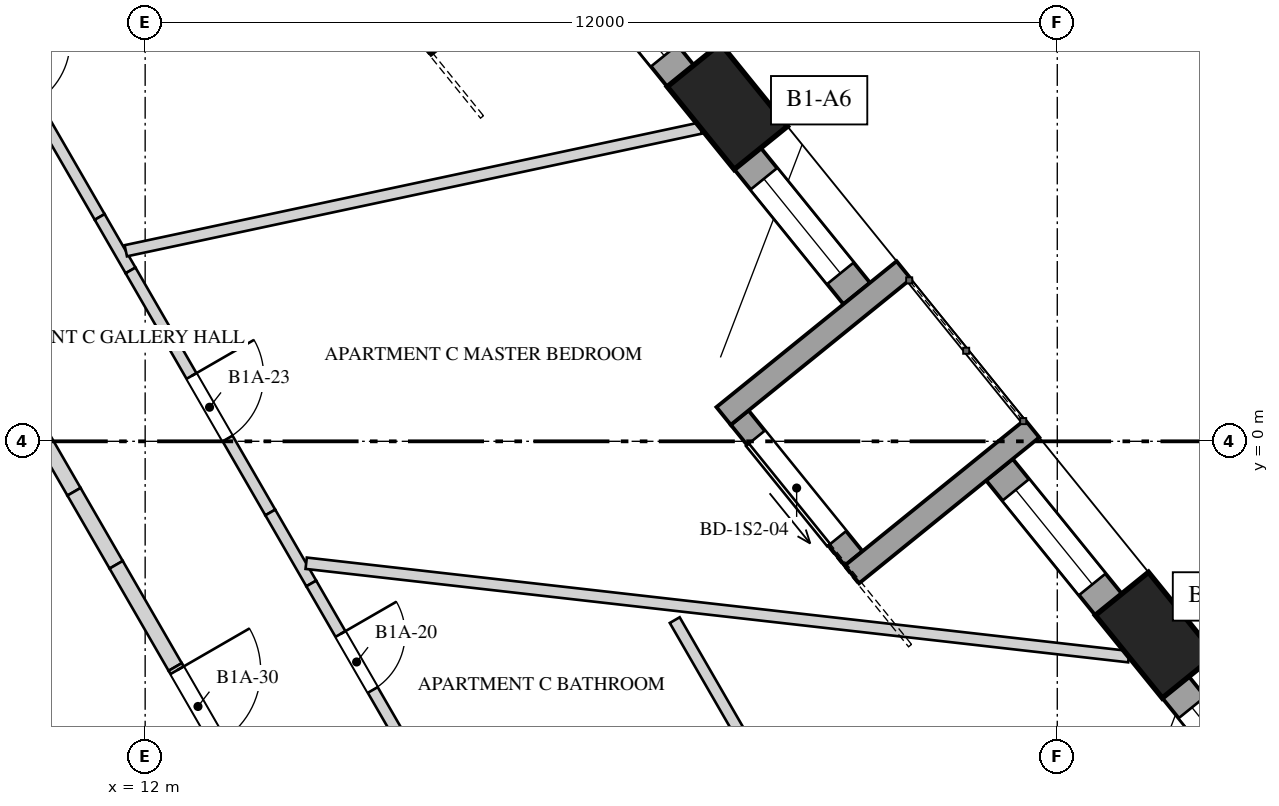
"""IFC4 building model, lengths in metres.
Left out: names, types, materials, properties, quantities, classifications, styles, units other than length and angle.
Written with IfcOpenShell. Run it as: python <this file> out.ifc"""

import sys

from ifc_helpers import new_model, si_unit, direction, frame, frame_2d, origin, origin_2d, place, context, subcontext, project, spatial, polyline, rectangle, outline, extrude, element, fill, save


model = new_model("IFC4")
c1 = context("Model", 3, precision=1e-05, world=origin(), true_north=direction((0.0, 1.0)))
c2 = subcontext(c1, "Body", "Model", "MODEL_VIEW")
j1 = project(units=[si_unit("LENGTHUNIT", "METRE"), si_unit("PLANEANGLEUNIT", "RADIAN")], contexts=[c1])
p1 = place(None, origin())
s1 = spatial("IfcSite", under=j1, at=p1, CompositionType="ELEMENT")
p2 = place(p1, origin())
s2 = spatial("IfcBuilding", under=s1, at=p2, CompositionType="ELEMENT")
p3 = place(p2, frame((0.0, 0.0, 51.2)))
s3 = spatial("IfcBuildingStorey", under=s2, at=p3, CompositionType="ELEMENT", Elevation=51.2)
for number, where, z_axis, x_axis in (
    (1, (25.291, -2.55, -0.35), (0.0, 0.0, 1.0), (-0.629, 0.777, 0.0)),
    (2, (19.659, 4.405, -0.35), (0.0, 0.0, 1.0), (-0.629, 0.777, 0.0)),
):
    element("IfcColumn", number, at=place(p3, frame(where, z_axis=z_axis, x_axis=x_axis)), inside=s3, PredefinedType="COLUMN", context=c2, shape_type="SweptSolid", body=[
        extrude(rectangle(XDim=1.4, YDim=0.9, at=origin_2d()), origin(), (0.0, 0.0, 1.0), 4.35),
    ])
p4 = place(p3, frame((26.993, -5.01, 0.0), z_axis=(0.0, 0.0, 1.0), x_axis=(-0.629339730135, 0.777130300576, 0.0)))
e3 = element("IfcWall", 3, at=p4, inside=s3, PredefinedType="SOLIDWALL", context=c2, shape_type="SweptSolid", body=[
    extrude(rectangle(XDim=2.283, YDim=0.45, at=frame_2d((1.142, 0.0))), origin(), (0.0, 0.0, 1.0), 3.3),
])
p5 = place(p4, frame((0.342, 0.0, 0.7)))
e4 = element("IfcOpeningElement", 4, at=p5, cuts=e3, PredefinedType="OPENING", context=c2, shape_type="SweptSolid", body=[
    extrude(rectangle(XDim=1.6, YDim=2.3, at=frame_2d((0.8, 1.15))), frame((0.0, 0.235, 0.0), z_axis=(0.0, -1.0, 0.0), x_axis=(1.0, 0.0, 0.0)), (0.0, 0.0, 1.0), 0.47),
])
p6 = place(p3, frame((24.676, -2.148, 0.0), z_axis=(0.0, 0.0, 1.0), x_axis=(-0.629287431131, 0.777172650716, 0.0)))
e5 = element("IfcWall", 5, at=p6, inside=s3, PredefinedType="SOLIDWALL", context=c2, shape_type="SweptSolid", body=[
    extrude(rectangle(XDim=2.283, YDim=0.45, at=frame_2d((1.142, 0.0))), origin(), (0.0, 0.0, 1.0), 3.3),
])
p7 = place(p6, frame((0.342, 0.0, 0.7)))
e6 = element("IfcOpeningElement", 6, at=p7, cuts=e5, PredefinedType="OPENING", context=c2, shape_type="SweptSolid", body=[
    extrude(rectangle(XDim=1.6, YDim=2.3, at=frame_2d((0.8, 1.15))), frame((0.0, 0.235, 0.0), z_axis=(0.0, -1.0, 0.0), x_axis=(1.0, 0.0, 0.0)), (0.0, 0.0, 1.0), 0.47),
])
p8 = place(p3, frame((21.362, 1.945, 0.0), z_axis=(0.0, 0.0, 1.0), x_axis=(-0.629339730135, 0.777130300576, 0.0)))
e7 = element("IfcWall", 7, at=p8, inside=s3, PredefinedType="SOLIDWALL", context=c2, shape_type="SweptSolid", body=[
    extrude(rectangle(XDim=2.283, YDim=0.45, at=frame_2d((1.142, 0.0))), origin(), (0.0, 0.0, 1.0), 3.3),
])
p9 = place(p8, frame((0.342, 0.0, 0.7)))
e8 = element("IfcOpeningElement", 8, at=p9, cuts=e7, PredefinedType="OPENING", context=c2, shape_type="SweptSolid", body=[
    extrude(rectangle(XDim=1.6, YDim=2.3, at=frame_2d((0.8, 1.15))), frame((0.0, 0.235, 0.0), z_axis=(0.0, -1.0, 0.0), x_axis=(1.0, 0.0, 0.0)), (0.0, 0.0, 1.0), 0.47),
])
p10 = place(p3, frame((19.044, 4.807, 0.0), z_axis=(0.0, 0.0, 1.0), x_axis=(-0.629339730135, 0.777130300576, 0.0)))
e9 = element("IfcWall", 9, at=p10, inside=s3, PredefinedType="SOLIDWALL", context=c2, shape_type="SweptSolid", body=[
    extrude(rectangle(XDim=2.283, YDim=0.45, at=frame_2d((1.142, 0.0))), origin(), (0.0, 0.0, 1.0), 3.3),
])
p11 = place(p10, frame((0.342, 0.0, 0.7)))
e10 = element("IfcOpeningElement", 10, at=p11, cuts=e9, PredefinedType="OPENING", context=c2, shape_type="SweptSolid", body=[
    extrude(rectangle(XDim=1.6, YDim=2.3, at=frame_2d((0.8, 1.15))), frame((0.0, 0.235, 0.0), z_axis=(0.0, -1.0, 0.0), x_axis=(1.0, 0.0, 0.0)), (0.0, 0.0, 1.0), 0.47),
])
p12 = place(p3, frame((21.321, -1.541, 0.0), z_axis=(0.0, 0.0, 1.0), x_axis=(-0.629257171563, 0.777197151331, 0.0)))
e11 = element("IfcWall", 11, at=p12, inside=s3, PredefinedType="SOLIDWALL", context=c2, shape_type="SweptSolid", body=[
    extrude(rectangle(XDim=2.383, YDim=0.3, at=frame_2d((1.191, 0.0))), origin(), (0.0, 0.0, 1.0), 3.3),
])
p13 = place(p12, frame((0.342, 0.0, 0.0)))
e12 = element("IfcOpeningElement", 12, at=p13, cuts=e11, PredefinedType="OPENING", context=c2, shape_type="SweptSolid", body=[
    extrude(rectangle(XDim=1.7, YDim=2.4, at=frame_2d((0.85, 1.2))), frame((0.0, 0.16, 0.0), z_axis=(0.0, -1.0, 0.0), x_axis=(1.0, 0.0, 0.0)), (0.0, 0.0, 1.0), 0.32),
])
for number, where, z_axis, x_axis in (
    (13, (23.669, 0.168, 0.0), (0.0, 0.0, 1.0), (-0.777, -0.629, 0.0)),
    (14, (21.98, 2.253, 0.0), (0.0, 0.0, 1.0), (-0.777, -0.629, 0.0)),
):
    element("IfcWall", number, at=place(p3, frame(where, z_axis=z_axis, x_axis=x_axis)), inside=s3, PredefinedType="SOLIDWALL", context=c2, shape_type="SweptSolid", body=[
        extrude(rectangle(XDim=3.05, YDim=0.3, at=frame_2d((1.525, 0.0))), origin(), (0.0, 0.0, 1.0), 3.3),
    ])
p14 = place(p3, frame((18.037, 7.123, 0.0), z_axis=(0.0, 0.0, 1.0), x_axis=(-0.777153523895, -0.629311052102, 0.0)))
e15 = element("IfcWall", 15, at=p14, inside=s3, PredefinedType="SOLIDWALL", context=c2, shape_type="SweptSolid", body=[
    extrude(rectangle(XDim=3.05, YDim=0.3, at=frame_2d((1.525, 0.0))), origin(), (0.0, 0.0, 1.0), 3.3),
])
p15 = place(p3, frame((9.101, 6.936, 0.0), z_axis=(0.0, 0.0, 1.0), x_axis=(0.500008794324, -0.866020326319, 0.0)))
e16 = element("IfcWall", 16, at=p15, inside=s3, PredefinedType="PARTITIONING", context=c2, shape_type="SweptSolid", body=[
    extrude(rectangle(XDim=4.601, YDim=0.15, at=frame_2d((2.3, 0.0))), origin(), (0.0, 0.0, 1.0), 3.65),
])
p16 = place(p15, frame((1.922, 0.0, 0.0)))
e17 = element("IfcOpeningElement", 17, at=p16, cuts=e16, PredefinedType="OPENING", context=c2, shape_type="SweptSolid", body=[
    extrude(rectangle(XDim=0.95, YDim=2.4, at=frame_2d((0.475, 1.2))), frame((0.0, 0.085, 0.0), z_axis=(0.0, -1.0, 0.0), x_axis=(1.0, 0.0, 0.0)), (0.0, 0.0, 1.0), 0.17),
])
p17 = place(p3, frame((11.402, 2.952, 0.0), z_axis=(0.0, 0.0, 1.0), x_axis=(0.500147393723, -0.865940289253, 0.0)))
e18 = element("IfcWall", 18, at=p17, inside=s3, PredefinedType="PARTITIONING", context=c2, shape_type="SweptSolid", body=[
    extrude(rectangle(XDim=0.812, YDim=0.15, at=frame_2d((0.406, 0.0))), origin(), (0.0, 0.0, 1.0), 2.75),
])
p18 = place(p3, frame((11.808, 2.248, 0.0), z_axis=(0.0, 0.0, 1.0), x_axis=(0.500002145574, -0.866024165033, 0.0)))
e19 = element("IfcWall", 19, at=p18, inside=s3, PredefinedType="PARTITIONING", context=c2, shape_type="SweptSolid", body=[
    extrude(rectangle(XDim=3.677, YDim=0.15, at=frame_2d((1.839, 0.0))), origin(), (0.0, 0.0, 1.0), 3.65),
])
p19 = place(p18, frame((1.604, 0.0, 0.0)))
e20 = element("IfcOpeningElement", 20, at=p19, cuts=e19, PredefinedType="OPENING", context=c2, shape_type="SweptSolid", body=[
    extrude(rectangle(XDim=0.95, YDim=2.4, at=frame_2d((0.475, 1.2))), frame((0.0, 0.085, 0.0), z_axis=(0.0, -1.0, 0.0), x_axis=(1.0, 0.0, 0.0)), (0.0, 0.0, 1.0), 0.17),
])
p20 = place(p3, frame((13.646, -0.936, 0.0), z_axis=(0.0, 0.0, 1.0), x_axis=(0.499938053331, -0.866061165757, 0.0)))
e21 = element("IfcWall", 21, at=p20, inside=s3, PredefinedType="PARTITIONING", context=c2, shape_type="SweptSolid", body=[
    extrude(rectangle(XDim=1.078, YDim=0.15, at=frame_2d((0.539, 0.0))), origin(), (0.0, 0.0, 1.0), 2.55),
])
p21 = place(p3, frame((14.186, -1.87, 0.0), z_axis=(0.0, 0.0, 1.0), x_axis=(0.499999305434, -0.866025804792, 0.0)))
e22 = element("IfcWall", 22, at=p21, inside=s3, PredefinedType="PARTITIONING", context=c2, shape_type="SweptSolid", body=[
    extrude(rectangle(XDim=2.748, YDim=0.15, at=frame_2d((1.374, 0.0))), origin(), (0.0, 0.0, 1.0), 3.65),
])
p22 = place(p21, frame((0.768, 0.0, 0.0)))
e23 = element("IfcOpeningElement", 23, at=p22, cuts=e22, PredefinedType="OPENING", context=c2, shape_type="SweptSolid", body=[
    extrude(rectangle(XDim=0.85, YDim=2.4, at=frame_2d((0.425, 1.2))), frame((0.0, 0.085, 0.0), z_axis=(0.0, -1.0, 0.0), x_axis=(1.0, 0.0, 0.0)), (0.0, 0.0, 1.0), 0.17),
])
p23 = place(p3, frame((11.745, 2.507, 0.0), z_axis=(0.0, 0.0, 1.0), x_axis=(0.97797299527, 0.208731455516, 0.0)))
e24 = element("IfcWall", 24, at=p23, inside=s3, PredefinedType="PARTITIONING", context=c2, shape_type="SweptSolid", body=[
    extrude(rectangle(XDim=7.735, YDim=0.15, at=frame_2d((3.867, 0.0))), origin(), (0.0, 0.0, 1.0), 2.75),
])
p24 = place(p3, frame((14.118, -1.604, 0.0), z_axis=(0.0, 0.0, 1.0), x_axis=(0.993609026083, -0.112876495722, 0.0)))
e25 = element("IfcWall", 25, at=p24, inside=s3, PredefinedType="PARTITIONING", context=c2, shape_type="SweptSolid", body=[
    extrude(rectangle(XDim=10.892, YDim=0.15, at=frame_2d((5.446, 0.0))), origin(), (0.0, 0.0, 1.0), 2.55),
])
p25 = place(p3, frame((18.967, -2.352, 0.0), z_axis=(0.0, 0.0, 1.0), x_axis=(0.499973180286, -0.8660408876, 0.0)))
e26 = element("IfcWall", 26, at=p25, inside=s3, PredefinedType="PARTITIONING", context=c2, shape_type="SweptSolid", body=[
    extrude(rectangle(XDim=2.191, YDim=0.15, at=frame_2d((1.096, 0.0))), origin(), (0.0, 0.0, 1.0), 3.65),
])
p26 = place(p3, frame((9.667, 1.756, 0.0), z_axis=(0.0, 0.0, 1.0), x_axis=(0.499964529649, -0.866045881633, 0.0)))
e27 = element("IfcWall", 27, at=p26, inside=s3, PredefinedType="SOLIDWALL", context=c2, shape_type="SweptSolid", body=[
    extrude(rectangle(XDim=2.794, YDim=0.2, at=frame_2d((1.397, 0.0))), origin(), (0.0, 0.0, 1.0), 3.65),
])
p27 = place(p3, frame((11.064, -0.663, 0.0), z_axis=(0.0, 0.0, 1.0), x_axis=(0.499951133605, -0.866053614973, 0.0)))
e28 = element("IfcWall", 28, at=p27, inside=s3, PredefinedType="SOLIDWALL", context=c2, shape_type="SweptSolid", body=[
    extrude(rectangle(XDim=1.109, YDim=0.2, at=frame_2d((0.554, 0.0))), origin(), (0.0, 0.0, 1.0), 2.55),
])
p28 = place(p3, frame((11.618, -1.624, 0.0), z_axis=(0.0, 0.0, 1.0), x_axis=(0.50011257031, -0.86596040153, 0.0)))
e29 = element("IfcWall", 29, at=p28, inside=s3, PredefinedType="SOLIDWALL", context=c2, shape_type="SweptSolid", body=[
    extrude(rectangle(XDim=1.553, YDim=0.2, at=frame_2d((0.776, 0.0))), origin(), (0.0, 0.0, 1.0), 3.65),
])
p29 = place(p3, frame((12.395, -2.969, 0.0), z_axis=(0.0, 0.0, 1.0), x_axis=(0.499936694431, -0.866061950187, 0.0)))
e30 = element("IfcWall", 30, at=p29, inside=s3, PredefinedType="SOLIDWALL", context=c2, shape_type="SweptSolid", body=[
    extrude(outline(polyline([(0.0, 0.0), (1.48, 0.0), (1.479, 2.55), (0.409, 2.55), (0.409, 3.65), (0.0, 3.65), (0.0, 0.0)])), frame((0.0, 0.1, 0.0), z_axis=(0.0, -1.0, 0.0), x_axis=(1.0, 0.0, 0.0)), (0.0, 0.0, 1.0), 0.2),
])
p30 = place(p29, frame((0.05, 0.0, 0.0)))
e31 = element("IfcOpeningElement", 31, at=p30, cuts=e30, PredefinedType="OPENING", context=c2, shape_type="SweptSolid", body=[
    extrude(rectangle(XDim=1.1, YDim=2.4, at=frame_2d((0.55, 1.2))), frame((0.0, 0.11, 0.0), z_axis=(0.0, -1.0, 0.0), x_axis=(1.0, 0.0, 0.0)), (0.0, 0.0, 1.0), 0.22),
])
p31 = place(p5, origin())
e32 = element("IfcWindow", 32, at=p31, inside=s3, PartitioningType="SINGLE_PANEL", PredefinedType="WINDOW", context=c2, shape_type="SweptSolid", body=[
    extrude(rectangle(XDim=1.6, YDim=2.3, at=frame_2d((0.8, 1.15))), frame((0.0, 0.03, 0.0), z_axis=(0.0, -1.0, 0.0), x_axis=(1.0, 0.0, 0.0)), (0.0, 0.0, 1.0), 0.06),
])
fill(e4, e32)
p32 = place(p7, origin())
e33 = element("IfcWindow", 33, at=p32, inside=s3, PartitioningType="SINGLE_PANEL", PredefinedType="WINDOW", context=c2, shape_type="SweptSolid", body=[
    extrude(rectangle(XDim=1.6, YDim=2.3, at=frame_2d((0.8, 1.15))), frame((0.0, 0.03, 0.0), z_axis=(0.0, -1.0, 0.0), x_axis=(1.0, 0.0, 0.0)), (0.0, 0.0, 1.0), 0.06),
])
fill(e6, e33)
p33 = place(p9, origin())
e34 = element("IfcWindow", 34, at=p33, inside=s3, PartitioningType="SINGLE_PANEL", PredefinedType="WINDOW", context=c2, shape_type="SweptSolid", body=[
    extrude(rectangle(XDim=1.6, YDim=2.3, at=frame_2d((0.8, 1.15))), frame((0.0, 0.03, 0.0), z_axis=(0.0, -1.0, 0.0), x_axis=(1.0, 0.0, 0.0)), (0.0, 0.0, 1.0), 0.06),
])
fill(e8, e34)
p34 = place(p11, origin())
e35 = element("IfcWindow", 35, at=p34, inside=s3, PartitioningType="SINGLE_PANEL", PredefinedType="WINDOW", context=c2, shape_type="SweptSolid", body=[
    extrude(rectangle(XDim=1.6, YDim=2.3, at=frame_2d((0.8, 1.15))), frame((0.0, 0.03, 0.0), z_axis=(0.0, -1.0, 0.0), x_axis=(1.0, 0.0, 0.0)), (0.0, 0.0, 1.0), 0.06),
])
fill(e10, e35)
p35 = place(p13, origin())
e36 = element("IfcDoor", 36, at=p35, inside=s3, OperationType="SLIDING_TO_LEFT", PredefinedType="DOOR", context=c2, shape_type="SweptSolid", body=[
    extrude(rectangle(XDim=1.7, YDim=2.4, at=frame_2d((0.85, 1.2))), frame((0.0, 0.025, 0.0), z_axis=(0.0, -1.0, 0.0), x_axis=(1.0, 0.0, 0.0)), (0.0, 0.0, 1.0), 0.05),
])
fill(e12, e36)
p36 = place(p22, origin())
e37 = element("IfcDoor", 37, at=p36, inside=s3, OperationType="SINGLE_SWING_RIGHT", PredefinedType="DOOR", context=c2, shape_type="SweptSolid", body=[
    extrude(rectangle(XDim=0.85, YDim=2.4, at=frame_2d((0.425, 1.2))), frame((0.0, 0.025, 0.0), z_axis=(0.0, -1.0, 0.0), x_axis=(1.0, 0.0, 0.0)), (0.0, 0.0, 1.0), 0.05),
])
fill(e23, e37)
p37 = place(p19, origin())
e38 = element("IfcDoor", 38, at=p37, inside=s3, OperationType="SINGLE_SWING_LEFT", PredefinedType="DOOR", context=c2, shape_type="SweptSolid", body=[
    extrude(rectangle(XDim=0.95, YDim=2.4, at=frame_2d((0.475, 1.2))), frame((0.0, 0.025, 0.0), z_axis=(0.0, -1.0, 0.0), x_axis=(1.0, 0.0, 0.0)), (0.0, 0.0, 1.0), 0.05),
])
fill(e20, e38)
p38 = place(p30, origin())
e39 = element("IfcDoor", 39, at=p38, inside=s3, OperationType="SINGLE_SWING_RIGHT", PredefinedType="DOOR", context=c2, shape_type="SweptSolid", body=[
    extrude(rectangle(XDim=1.1, YDim=2.4, at=frame_2d((0.55, 1.2))), frame((0.0, 0.025, 0.0), z_axis=(0.0, -1.0, 0.0), x_axis=(1.0, 0.0, 0.0)), (0.0, 0.0, 1.0), 0.05),
])
fill(e31, e39)
save(model, sys.argv[1])
